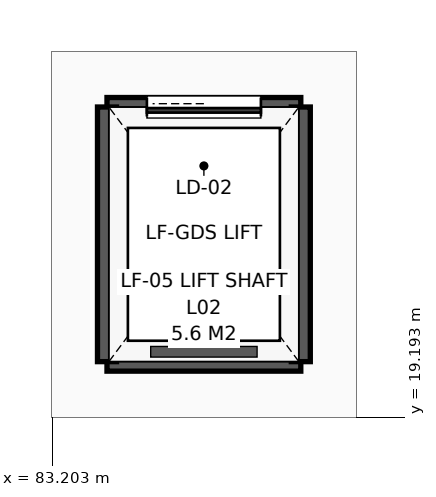
"""IFC4 building model, lengths in metres.
Left out: names, types, materials, properties, quantities, classifications, styles, units other than length and angle.
Written with IfcOpenShell. Run it as: python <this file> out.ifc"""

import sys

from ifc_helpers import new_model, si_unit, direction, frame, frame_2d, origin, place, context, subcontext, project, spatial, rectangle, extrude, element, fill, save


model = new_model("IFC4")
c1 = context("Model", 3, precision=1e-05, world=origin(), true_north=direction((0.0, 1.0)))
c2 = subcontext(c1, "Body", "Model", "MODEL_VIEW")
j1 = project(units=[si_unit("LENGTHUNIT", "METRE"), si_unit("PLANEANGLEUNIT", "RADIAN")], contexts=[c1])
p1 = place(None, origin())
s1 = spatial("IfcSite", under=j1, at=p1, CompositionType="ELEMENT")
p2 = place(p1, origin())
s2 = spatial("IfcBuilding", under=s1, at=p2, CompositionType="ELEMENT")
p3 = place(p2, frame((0.0, 0.0, 9.0)))
s3 = spatial("IfcBuildingStorey", under=s2, at=p3, CompositionType="ELEMENT", Elevation=9.0)
p4 = place(p3, frame((83.925, 19.925, 0.0), z_axis=(0.0, 0.0, 1.0), x_axis=(1.0, 0.0, 0.0)))
e1 = element("IfcWall", 1, at=p4, inside=s3, PredefinedType="SHEAR", context=c2, shape_type="SweptSolid", body=[
    extrude(rectangle(XDim=2.55, YDim=0.25, at=frame_2d((1.275, 0.0))), origin(), (0.0, 0.0, 1.0), 3.55),
])
p5 = place(p3, frame((86.475, 23.275, 0.0), z_axis=(0.0, 0.0, 1.0), x_axis=(-1.0, 0.0, 0.0)))
e2 = element("IfcWall", 2, at=p5, inside=s3, PredefinedType="SHEAR", context=c2, shape_type="SweptSolid", body=[
    extrude(rectangle(XDim=2.55, YDim=0.25, at=frame_2d((1.275, 0.0))), origin(), (0.0, 0.0, 1.0), 3.55),
])
p6 = place(p5, frame((0.525, 0.0, 0.0)))
e3 = element("IfcOpeningElement", 3, at=p6, cuts=e2, PredefinedType="OPENING", context=c2, shape_type="SweptSolid", body=[
    extrude(rectangle(XDim=1.5, YDim=2.2, at=frame_2d((0.75, 1.1))), frame((0.0, 0.135, 0.0), z_axis=(0.0, -1.0, 0.0), x_axis=(1.0, 0.0, 0.0)), (0.0, 0.0, 1.0), 0.27),
])
for number, where, z_axis, x_axis in (
    (4, (83.925, 23.275, 0.0), (0.0, 0.0, 1.0), (0.0, -1.0, 0.0)),
    (5, (86.475, 19.925, 0.0), (0.0, 0.0, 1.0), (0.0, 1.0, 0.0)),
):
    element("IfcWall", number, at=place(p3, frame(where, z_axis=z_axis, x_axis=x_axis)), inside=s3, PredefinedType="SHEAR", context=c2, shape_type="SweptSolid", body=[
        extrude(rectangle(XDim=3.35, YDim=0.25, at=frame_2d((1.675, 0.0))), origin(), (0.0, 0.0, 1.0), 3.55),
    ])
p7 = place(p6, origin())
e6 = element("IfcDoor", 6, at=p7, inside=s3, OperationType="SLIDING_TO_RIGHT", PredefinedType="DOOR", context=c2, shape_type="SweptSolid", body=[
    extrude(rectangle(XDim=1.5, YDim=2.2, at=frame_2d((0.75, 1.1))), frame((0.0, 0.025, 0.0), z_axis=(0.0, -1.0, 0.0), x_axis=(1.0, 0.0, 0.0)), (0.0, 0.0, 1.0), 0.05),
])
fill(e3, e6)
save(model, sys.argv[1])
